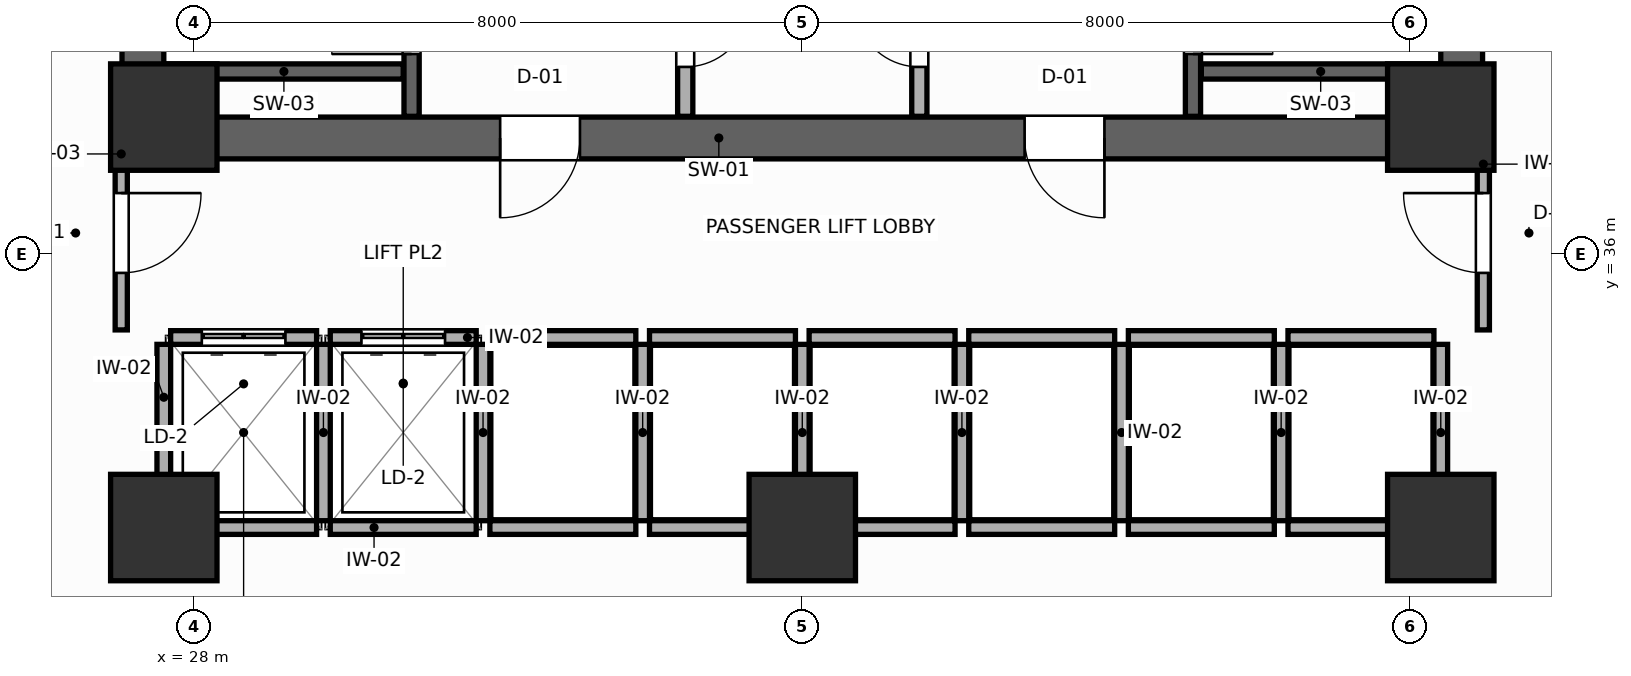
"""IFC4 building model, lengths in metres.
Left out: names, types, materials, properties, quantities, classifications, styles, units other than length and angle.
Written with IfcOpenShell. Run it as: python <this file> out.ifc"""

import sys

from ifc_helpers import new_model, si_unit, direction, frame, frame_2d, origin, origin_2d, place, context, subcontext, project, spatial, rectangle, extrude, source, transform, mapped, element, fill, save


model = new_model("IFC4")
c1 = context("Model", 3, precision=1e-05, world=origin(), true_north=direction((0.0, 1.0)))
c2 = subcontext(c1, "Body", "Model", "MODEL_VIEW")
j1 = project(units=[si_unit("LENGTHUNIT", "METRE"), si_unit("PLANEANGLEUNIT", "RADIAN")], contexts=[c1])
p1 = place(None, origin())
s1 = spatial("IfcSite", under=j1, at=p1, CompositionType="ELEMENT")
p2 = place(p1, origin())
s2 = spatial("IfcBuilding", under=s1, at=p2, CompositionType="ELEMENT")
p3 = place(p2, frame((0.0, 0.0, 79.5)))
s3 = spatial("IfcBuildingStorey", under=s2, at=p3, CompositionType="ELEMENT", Elevation=79.5)
p4 = place(p3, frame((27.05, 37.525, 0.0), z_axis=(0.0, 0.0, 1.0), x_axis=(1.0, 0.0, 0.0)))
e1 = element("IfcWall", 1, at=p4, inside=s3, PredefinedType="SHEAR", context=c2, shape_type="SweptSolid", body=[
    extrude(rectangle(XDim=17.9, YDim=0.55, at=frame_2d((8.95, 0.0))), origin(), (0.0, 0.0, 1.0), 3.9),
])
p5 = place(p4, frame((4.975, 0.0, 0.0)))
e2 = element("IfcOpeningElement", 2, at=p5, cuts=e1, PredefinedType="OPENING", context=c2, shape_type="SweptSolid", body=[
    extrude(rectangle(XDim=1.05, YDim=2.1, at=frame_2d((0.525, 1.05))), frame((0.0, 0.285, 0.0), z_axis=(0.0, -1.0, 0.0), x_axis=(1.0, 0.0, 0.0)), (0.0, 0.0, 1.0), 0.57),
])
p6 = place(p4, frame((11.875, 0.0, 0.0)))
e3 = element("IfcOpeningElement", 3, at=p6, cuts=e1, PredefinedType="OPENING", context=c2, shape_type="SweptSolid", body=[
    extrude(rectangle(XDim=1.05, YDim=2.1, at=frame_2d((0.525, 1.05))), frame((0.0, 0.285, 0.0), z_axis=(0.0, -1.0, 0.0), x_axis=(1.0, 0.0, 0.0)), (0.0, 0.0, 1.0), 0.57),
])
for number, where, z_axis, x_axis in (
    (4, (27.325, 37.8, 0.0), (0.0, 0.0, 1.0), (0.0, 1.0, 0.0)),
    (5, (44.675, 37.8, 0.0), (0.0, 0.0, 1.0), (0.0, 1.0, 0.0)),
):
    element("IfcWall", number, at=place(p3, frame(where, z_axis=z_axis, x_axis=x_axis)), inside=s3, PredefinedType="SHEAR", context=c2, shape_type="SweptSolid", body=[
        extrude(rectangle(XDim=9.0, YDim=0.55, at=frame_2d((4.5, 0.0))), origin(), (0.0, 0.0, 1.0), 3.9),
    ])
m1 = source(origin(), c2, "Body", "SweptSolid", [
    extrude(rectangle(XDim=1.4, YDim=1.4, at=origin_2d()), origin(), (0.0, 0.0, 1.0), 3.9),
])
for number, where, z_axis, x_axis in (
    (6, (27.6, 37.8, 0.0), (0.0, 0.0, 1.0), (1.0, 0.0, 0.0)),
    (7, (44.4, 37.8, 0.0), (0.0, 0.0, 1.0), (1.0, 0.0, 0.0)),
    (8, (27.6, 32.4, 0.0), (0.0, 0.0, 1.0), (1.0, 0.0, 0.0)),
    (9, (44.4, 32.4, 0.0), (0.0, 0.0, 1.0), (1.0, 0.0, 0.0)),
    (10, (36.0, 32.4, 0.0), (0.0, 0.0, 1.0), (1.0, 0.0, 0.0)),
):
    element("IfcColumn", number, at=place(p3, frame(where, z_axis=z_axis, x_axis=x_axis)), inside=s3, PredefinedType="COLUMN", context=c2, shape_type="MappedRepresentation", body=[
        mapped(m1, transform((0.0, 0.0, 0.0), scale=1.0)),
    ])
p7 = place(p3, frame((30.86, 37.81, 0.0), z_axis=(0.0, 0.0, 1.0), x_axis=(0.0, 1.0, 0.0)))
e11 = element("IfcWall", 11, at=p7, inside=s3, PredefinedType="SHEAR", context=c2, shape_type="SweptSolid", body=[
    extrude(rectangle(XDim=8.98, YDim=0.2, at=frame_2d((4.49, 0.0))), origin(), (0.0, 0.0, 1.0), 3.9),
])
p8 = place(p7, frame((0.82, 0.0, 0.0)))
e12 = element("IfcOpeningElement", 12, at=p8, cuts=e11, PredefinedType="OPENING", context=c2, shape_type="SweptSolid", body=[
    extrude(rectangle(XDim=1.05, YDim=2.1, at=frame_2d((0.525, 1.05))), frame((0.0, 0.11, 0.0), z_axis=(0.0, -1.0, 0.0), x_axis=(1.0, 0.0, 0.0)), (0.0, 0.0, 1.0), 0.22),
])
p9 = place(p3, frame((27.61, 38.4, 0.0), z_axis=(0.0, 0.0, 1.0), x_axis=(1.0, 0.0, 0.0)))
e13 = element("IfcWall", 13, at=p9, inside=s3, PredefinedType="SHEAR", context=c2, shape_type="SweptSolid", body=[
    extrude(rectangle(XDim=3.14, YDim=0.2, at=frame_2d((1.57, 0.0))), origin(), (0.0, 0.0, 1.0), 3.9),
])
p10 = place(p3, frame((41.14, 37.81, 0.0), z_axis=(0.0, 0.0, 1.0), x_axis=(0.0, 1.0, 0.0)))
e14 = element("IfcWall", 14, at=p10, inside=s3, PredefinedType="SHEAR", context=c2, shape_type="SweptSolid", body=[
    extrude(rectangle(XDim=8.98, YDim=0.2, at=frame_2d((4.49, 0.0))), origin(), (0.0, 0.0, 1.0), 3.9),
])
p11 = place(p10, frame((0.82, 0.0, 0.0)))
e15 = element("IfcOpeningElement", 15, at=p11, cuts=e14, PredefinedType="OPENING", context=c2, shape_type="SweptSolid", body=[
    extrude(rectangle(XDim=1.05, YDim=2.1, at=frame_2d((0.525, 1.05))), frame((0.0, 0.11, 0.0), z_axis=(0.0, -1.0, 0.0), x_axis=(1.0, 0.0, 0.0)), (0.0, 0.0, 1.0), 0.22),
])
p12 = place(p3, frame((41.25, 38.4, 0.0), z_axis=(0.0, 0.0, 1.0), x_axis=(1.0, 0.0, 0.0)))
e16 = element("IfcWall", 16, at=p12, inside=s3, PredefinedType="SHEAR", context=c2, shape_type="SweptSolid", body=[
    extrude(rectangle(XDim=3.14, YDim=0.2, at=frame_2d((1.57, 0.0))), origin(), (0.0, 0.0, 1.0), 3.9),
])
p13 = place(p3, frame((34.46, 37.81, 0.0), z_axis=(0.0, 0.0, 1.0), x_axis=(0.0, 1.0, 0.0)))
e17 = element("IfcWall", 17, at=p13, inside=s3, PredefinedType="PARTITIONING", context=c2, shape_type="SweptSolid", body=[
    extrude(rectangle(XDim=8.98, YDim=0.2, at=frame_2d((4.49, 0.0))), origin(), (0.0, 0.0, 1.0), 3.68),
])
p14 = place(p13, frame((0.65, 0.0, 0.0)))
e18 = element("IfcOpeningElement", 18, at=p14, cuts=e17, PredefinedType="OPENING", context=c2, shape_type="SweptSolid", body=[
    extrude(rectangle(XDim=0.85, YDim=2.05, at=frame_2d((0.425, 1.025))), frame((0.0, 0.11, 0.0), z_axis=(0.0, -1.0, 0.0), x_axis=(1.0, 0.0, 0.0)), (0.0, 0.0, 1.0), 0.22),
])
p15 = place(p3, frame((37.54, 37.81, 0.0), z_axis=(0.0, 0.0, 1.0), x_axis=(0.0, 1.0, 0.0)))
e19 = element("IfcWall", 19, at=p15, inside=s3, PredefinedType="PARTITIONING", context=c2, shape_type="SweptSolid", body=[
    extrude(rectangle(XDim=8.98, YDim=0.2, at=frame_2d((4.49, 0.0))), origin(), (0.0, 0.0, 1.0), 3.68),
])
p16 = place(p15, frame((0.65, 0.0, 0.0)))
e20 = element("IfcOpeningElement", 20, at=p16, cuts=e19, PredefinedType="OPENING", context=c2, shape_type="SweptSolid", body=[
    extrude(rectangle(XDim=0.85, YDim=2.05, at=frame_2d((0.425, 1.025))), frame((0.0, 0.11, 0.0), z_axis=(0.0, -1.0, 0.0), x_axis=(1.0, 0.0, 0.0)), (0.0, 0.0, 1.0), 0.22),
])
p17 = place(p3, frame((27.69, 34.9, 0.0), z_axis=(0.0, 0.0, 1.0), x_axis=(1.0, 0.0, 0.0)))
e21 = element("IfcWall", 21, at=p17, inside=s3, PredefinedType="PARTITIONING", context=c2, shape_type="SweptSolid", body=[
    extrude(rectangle(XDim=1.92, YDim=0.18, at=frame_2d((0.96, 0.0))), origin(), (0.0, 0.0, 1.0), 3.68),
])
p18 = place(p17, frame((0.41, 0.0, 0.0)))
e22 = element("IfcOpeningElement", 22, at=p18, cuts=e21, PredefinedType="OPENING", context=c2, shape_type="SweptSolid", body=[
    extrude(rectangle(XDim=1.1, YDim=2.1, at=frame_2d((0.55, 1.05))), frame((0.0, 0.1, 0.0), z_axis=(0.0, -1.0, 0.0), x_axis=(1.0, 0.0, 0.0)), (0.0, 0.0, 1.0), 0.2),
])
p19 = place(p3, frame((27.69, 32.4, 0.0), z_axis=(0.0, 0.0, 1.0), x_axis=(1.0, 0.0, 0.0)))
e23 = element("IfcWall", 23, at=p19, inside=s3, PredefinedType="PARTITIONING", context=c2, shape_type="SweptSolid", body=[
    extrude(rectangle(XDim=1.92, YDim=0.18, at=frame_2d((0.96, 0.0))), origin(), (0.0, 0.0, 1.0), 3.18),
])
p20 = place(p3, frame((27.6, 32.49, 0.0), z_axis=(0.0, 0.0, 1.0), x_axis=(0.0, 1.0, 0.0)))
e24 = element("IfcWall", 24, at=p20, inside=s3, PredefinedType="PARTITIONING", context=c2, shape_type="SweptSolid", body=[
    extrude(rectangle(XDim=2.32, YDim=0.18, at=frame_2d((1.16, 0.0))), origin(), (0.0, 0.0, 1.0), 3.68),
])
p21 = place(p3, frame((29.79, 34.9, 0.0), z_axis=(0.0, 0.0, 1.0), x_axis=(1.0, 0.0, 0.0)))
e25 = element("IfcWall", 25, at=p21, inside=s3, PredefinedType="PARTITIONING", context=c2, shape_type="SweptSolid", body=[
    extrude(rectangle(XDim=1.92, YDim=0.18, at=frame_2d((0.96, 0.0))), origin(), (0.0, 0.0, 1.0), 3.68),
])
p22 = place(p21, frame((0.41, 0.0, 0.0)))
e26 = element("IfcOpeningElement", 26, at=p22, cuts=e25, PredefinedType="OPENING", context=c2, shape_type="SweptSolid", body=[
    extrude(rectangle(XDim=1.1, YDim=2.1, at=frame_2d((0.55, 1.05))), frame((0.0, 0.1, 0.0), z_axis=(0.0, -1.0, 0.0), x_axis=(1.0, 0.0, 0.0)), (0.0, 0.0, 1.0), 0.2),
])
p23 = place(p3, frame((29.79, 32.4, 0.0), z_axis=(0.0, 0.0, 1.0), x_axis=(1.0, 0.0, 0.0)))
e27 = element("IfcWall", 27, at=p23, inside=s3, PredefinedType="PARTITIONING", context=c2, shape_type="SweptSolid", body=[
    extrude(rectangle(XDim=1.92, YDim=0.18, at=frame_2d((0.96, 0.0))), origin(), (0.0, 0.0, 1.0), 3.18),
])
p24 = place(p3, frame((29.7, 32.49, 0.0), z_axis=(0.0, 0.0, 1.0), x_axis=(0.0, 1.0, 0.0)))
e28 = element("IfcWall", 28, at=p24, inside=s3, PredefinedType="PARTITIONING", context=c2, shape_type="SweptSolid", body=[
    extrude(rectangle(XDim=2.32, YDim=0.18, at=frame_2d((1.16, 0.0))), origin(), (0.0, 0.0, 1.0), 3.68),
])
p25 = place(p3, frame((31.89, 34.9, 0.0), z_axis=(0.0, 0.0, 1.0), x_axis=(1.0, 0.0, 0.0)))
e29 = element("IfcWall", 29, at=p25, inside=s3, PredefinedType="PARTITIONING", context=c2, shape_type="SweptSolid", body=[
    extrude(rectangle(XDim=1.92, YDim=0.18, at=frame_2d((0.96, 0.0))), origin(), (0.0, 0.0, 1.0), 3.68),
])
p26 = place(p3, frame((31.89, 32.4, 0.0), z_axis=(0.0, 0.0, 1.0), x_axis=(1.0, 0.0, 0.0)))
e30 = element("IfcWall", 30, at=p26, inside=s3, PredefinedType="PARTITIONING", context=c2, shape_type="SweptSolid", body=[
    extrude(rectangle(XDim=1.92, YDim=0.18, at=frame_2d((0.96, 0.0))), origin(), (0.0, 0.0, 1.0), 3.18),
])
p27 = place(p3, frame((31.8, 32.49, 0.0), z_axis=(0.0, 0.0, 1.0), x_axis=(0.0, 1.0, 0.0)))
e31 = element("IfcWall", 31, at=p27, inside=s3, PredefinedType="PARTITIONING", context=c2, shape_type="SweptSolid", body=[
    extrude(rectangle(XDim=2.32, YDim=0.18, at=frame_2d((1.16, 0.0))), origin(), (0.0, 0.0, 1.0), 3.68),
])
p28 = place(p3, frame((33.99, 34.9, 0.0), z_axis=(0.0, 0.0, 1.0), x_axis=(1.0, 0.0, 0.0)))
e32 = element("IfcWall", 32, at=p28, inside=s3, PredefinedType="PARTITIONING", context=c2, shape_type="SweptSolid", body=[
    extrude(rectangle(XDim=1.92, YDim=0.18, at=frame_2d((0.96, 0.0))), origin(), (0.0, 0.0, 1.0), 3.68),
])
p29 = place(p3, frame((33.99, 32.4, 0.0), z_axis=(0.0, 0.0, 1.0), x_axis=(1.0, 0.0, 0.0)))
e33 = element("IfcWall", 33, at=p29, inside=s3, PredefinedType="PARTITIONING", context=c2, shape_type="SweptSolid", body=[
    extrude(rectangle(XDim=1.92, YDim=0.18, at=frame_2d((0.96, 0.0))), origin(), (0.0, 0.0, 1.0), 3.18),
])
p30 = place(p3, frame((33.9, 32.49, 0.0), z_axis=(0.0, 0.0, 1.0), x_axis=(0.0, 1.0, 0.0)))
e34 = element("IfcWall", 34, at=p30, inside=s3, PredefinedType="PARTITIONING", context=c2, shape_type="SweptSolid", body=[
    extrude(rectangle(XDim=2.32, YDim=0.18, at=frame_2d((1.16, 0.0))), origin(), (0.0, 0.0, 1.0), 3.68),
])
p31 = place(p3, frame((36.09, 34.9, 0.0), z_axis=(0.0, 0.0, 1.0), x_axis=(1.0, 0.0, 0.0)))
e35 = element("IfcWall", 35, at=p31, inside=s3, PredefinedType="PARTITIONING", context=c2, shape_type="SweptSolid", body=[
    extrude(rectangle(XDim=1.92, YDim=0.18, at=frame_2d((0.96, 0.0))), origin(), (0.0, 0.0, 1.0), 3.68),
])
p32 = place(p3, frame((36.09, 32.4, 0.0), z_axis=(0.0, 0.0, 1.0), x_axis=(1.0, 0.0, 0.0)))
e36 = element("IfcWall", 36, at=p32, inside=s3, PredefinedType="PARTITIONING", context=c2, shape_type="SweptSolid", body=[
    extrude(rectangle(XDim=1.92, YDim=0.18, at=frame_2d((0.96, 0.0))), origin(), (0.0, 0.0, 1.0), 3.18),
])
p33 = place(p3, frame((36.0, 32.49, 0.0), z_axis=(0.0, 0.0, 1.0), x_axis=(0.0, 1.0, 0.0)))
e37 = element("IfcWall", 37, at=p33, inside=s3, PredefinedType="PARTITIONING", context=c2, shape_type="SweptSolid", body=[
    extrude(rectangle(XDim=2.32, YDim=0.18, at=frame_2d((1.16, 0.0))), origin(), (0.0, 0.0, 1.0), 3.68),
])
p34 = place(p3, frame((38.19, 34.9, 0.0), z_axis=(0.0, 0.0, 1.0), x_axis=(1.0, 0.0, 0.0)))
e38 = element("IfcWall", 38, at=p34, inside=s3, PredefinedType="PARTITIONING", context=c2, shape_type="SweptSolid", body=[
    extrude(rectangle(XDim=1.92, YDim=0.18, at=frame_2d((0.96, 0.0))), origin(), (0.0, 0.0, 1.0), 3.68),
])
p35 = place(p3, frame((38.19, 32.4, 0.0), z_axis=(0.0, 0.0, 1.0), x_axis=(1.0, 0.0, 0.0)))
e39 = element("IfcWall", 39, at=p35, inside=s3, PredefinedType="PARTITIONING", context=c2, shape_type="SweptSolid", body=[
    extrude(rectangle(XDim=1.92, YDim=0.18, at=frame_2d((0.96, 0.0))), origin(), (0.0, 0.0, 1.0), 3.18),
])
p36 = place(p3, frame((38.1, 32.49, 0.0), z_axis=(0.0, 0.0, 1.0), x_axis=(0.0, 1.0, 0.0)))
e40 = element("IfcWall", 40, at=p36, inside=s3, PredefinedType="PARTITIONING", context=c2, shape_type="SweptSolid", body=[
    extrude(rectangle(XDim=2.32, YDim=0.18, at=frame_2d((1.16, 0.0))), origin(), (0.0, 0.0, 1.0), 3.68),
])
p37 = place(p3, frame((40.29, 34.9, 0.0), z_axis=(0.0, 0.0, 1.0), x_axis=(1.0, 0.0, 0.0)))
e41 = element("IfcWall", 41, at=p37, inside=s3, PredefinedType="PARTITIONING", context=c2, shape_type="SweptSolid", body=[
    extrude(rectangle(XDim=1.92, YDim=0.18, at=frame_2d((0.96, 0.0))), origin(), (0.0, 0.0, 1.0), 3.68),
])
p38 = place(p3, frame((40.29, 32.4, 0.0), z_axis=(0.0, 0.0, 1.0), x_axis=(1.0, 0.0, 0.0)))
e42 = element("IfcWall", 42, at=p38, inside=s3, PredefinedType="PARTITIONING", context=c2, shape_type="SweptSolid", body=[
    extrude(rectangle(XDim=1.92, YDim=0.18, at=frame_2d((0.96, 0.0))), origin(), (0.0, 0.0, 1.0), 3.18),
])
p39 = place(p3, frame((40.2, 32.49, 0.0), z_axis=(0.0, 0.0, 1.0), x_axis=(0.0, 1.0, 0.0)))
e43 = element("IfcWall", 43, at=p39, inside=s3, PredefinedType="PARTITIONING", context=c2, shape_type="SweptSolid", body=[
    extrude(rectangle(XDim=2.32, YDim=0.18, at=frame_2d((1.16, 0.0))), origin(), (0.0, 0.0, 1.0), 3.68),
])
p40 = place(p3, frame((42.39, 34.9, 0.0), z_axis=(0.0, 0.0, 1.0), x_axis=(1.0, 0.0, 0.0)))
e44 = element("IfcWall", 44, at=p40, inside=s3, PredefinedType="PARTITIONING", context=c2, shape_type="SweptSolid", body=[
    extrude(rectangle(XDim=1.92, YDim=0.18, at=frame_2d((0.96, 0.0))), origin(), (0.0, 0.0, 1.0), 3.68),
])
p41 = place(p3, frame((42.39, 32.4, 0.0), z_axis=(0.0, 0.0, 1.0), x_axis=(1.0, 0.0, 0.0)))
e45 = element("IfcWall", 45, at=p41, inside=s3, PredefinedType="PARTITIONING", context=c2, shape_type="SweptSolid", body=[
    extrude(rectangle(XDim=1.92, YDim=0.18, at=frame_2d((0.96, 0.0))), origin(), (0.0, 0.0, 1.0), 3.18),
])
for number, where, z_axis, x_axis in (
    (46, (42.3, 32.49, 0.0), (0.0, 0.0, 1.0), (0.0, 1.0, 0.0)),
    (47, (44.4, 32.49, 0.0), (0.0, 0.0, 1.0), (0.0, 1.0, 0.0)),
):
    element("IfcWall", number, at=place(p3, frame(where, z_axis=z_axis, x_axis=x_axis)), inside=s3, PredefinedType="PARTITIONING", context=c2, shape_type="SweptSolid", body=[
        extrude(rectangle(XDim=2.32, YDim=0.18, at=frame_2d((1.16, 0.0))), origin(), (0.0, 0.0, 1.0), 3.68),
    ])
p42 = place(p3, frame((27.04, 35.0, 0.0), z_axis=(0.0, 0.0, 1.0), x_axis=(0.0, 1.0, 0.0)))
e48 = element("IfcWall", 48, at=p42, inside=s3, PredefinedType="PARTITIONING", context=c2, shape_type="SweptSolid", body=[
    extrude(rectangle(XDim=2.65, YDim=0.16, at=frame_2d((1.325, 0.0))), origin(), (0.0, 0.0, 1.0), 3.68),
])
p43 = place(p42, frame((0.75, 0.0, 0.0)))
e49 = element("IfcOpeningElement", 49, at=p43, cuts=e48, PredefinedType="OPENING", context=c2, shape_type="SweptSolid", body=[
    extrude(rectangle(XDim=1.05, YDim=2.1, at=frame_2d((0.525, 1.05))), frame((0.0, 0.09, 0.0), z_axis=(0.0, -1.0, 0.0), x_axis=(1.0, 0.0, 0.0)), (0.0, 0.0, 1.0), 0.18),
])
p44 = place(p3, frame((44.96, 35.0, 0.0), z_axis=(0.0, 0.0, 1.0), x_axis=(0.0, 1.0, 0.0)))
e50 = element("IfcWall", 50, at=p44, inside=s3, PredefinedType="PARTITIONING", context=c2, shape_type="SweptSolid", body=[
    extrude(rectangle(XDim=2.65, YDim=0.16, at=frame_2d((1.325, 0.0))), origin(), (0.0, 0.0, 1.0), 3.68),
])
p45 = place(p44, frame((0.75, 0.0, 0.0)))
e51 = element("IfcOpeningElement", 51, at=p45, cuts=e50, PredefinedType="OPENING", context=c2, shape_type="SweptSolid", body=[
    extrude(rectangle(XDim=1.05, YDim=2.1, at=frame_2d((0.525, 1.05))), frame((0.0, 0.09, 0.0), z_axis=(0.0, -1.0, 0.0), x_axis=(1.0, 0.0, 0.0)), (0.0, 0.0, 1.0), 0.18),
])
p46 = place(p8, origin())
e52 = element("IfcDoor", 52, at=p46, inside=s3, OperationType="SINGLE_SWING_LEFT", PredefinedType="DOOR", context=c2, shape_type="SweptSolid", body=[
    extrude(rectangle(XDim=1.05, YDim=2.1, at=frame_2d((0.525, 1.05))), frame((0.0, 0.025, 0.0), z_axis=(0.0, -1.0, 0.0), x_axis=(1.0, 0.0, 0.0)), (0.0, 0.0, 1.0), 0.05),
])
fill(e12, e52)
p47 = place(p11, frame((1.05, 0.0, 0.0), z_axis=(0.0, 0.0, 1.0), x_axis=(-1.0, 0.0, 0.0)))
e53 = element("IfcDoor", 53, at=p47, inside=s3, OperationType="SINGLE_SWING_RIGHT", PredefinedType="DOOR", context=c2, shape_type="SweptSolid", body=[
    extrude(rectangle(XDim=1.05, YDim=2.1, at=frame_2d((0.525, 1.05))), frame((0.0, 0.025, 0.0), z_axis=(0.0, -1.0, 0.0), x_axis=(1.0, 0.0, 0.0)), (0.0, 0.0, 1.0), 0.05),
])
fill(e15, e53)
p48 = place(p14, frame((0.85, 0.0, 0.0), z_axis=(0.0, 0.0, 1.0), x_axis=(-1.0, 0.0, 0.0)))
e54 = element("IfcDoor", 54, at=p48, inside=s3, OperationType="SINGLE_SWING_LEFT", PredefinedType="DOOR", context=c2, shape_type="SweptSolid", body=[
    extrude(rectangle(XDim=0.85, YDim=2.05, at=frame_2d((0.425, 1.025))), frame((0.0, 0.025, 0.0), z_axis=(0.0, -1.0, 0.0), x_axis=(1.0, 0.0, 0.0)), (0.0, 0.0, 1.0), 0.05),
])
fill(e18, e54)
p49 = place(p16, origin())
e55 = element("IfcDoor", 55, at=p49, inside=s3, OperationType="SINGLE_SWING_RIGHT", PredefinedType="DOOR", context=c2, shape_type="SweptSolid", body=[
    extrude(rectangle(XDim=0.85, YDim=2.05, at=frame_2d((0.425, 1.025))), frame((0.0, 0.025, 0.0), z_axis=(0.0, -1.0, 0.0), x_axis=(1.0, 0.0, 0.0)), (0.0, 0.0, 1.0), 0.05),
])
fill(e20, e55)
p50 = place(p18, origin())
e56 = element("IfcDoor", 56, at=p50, inside=s3, OperationType="DOUBLE_DOOR_SLIDING", PredefinedType="DOOR", context=c2, shape_type="SweptSolid", body=[
    extrude(rectangle(XDim=1.1, YDim=2.1, at=frame_2d((0.55, 1.05))), frame((0.0, 0.025, 0.0), z_axis=(0.0, -1.0, 0.0), x_axis=(1.0, 0.0, 0.0)), (0.0, 0.0, 1.0), 0.05),
])
fill(e22, e56)
p51 = place(p22, origin())
e57 = element("IfcDoor", 57, at=p51, inside=s3, OperationType="DOUBLE_DOOR_SLIDING", PredefinedType="DOOR", context=c2, shape_type="SweptSolid", body=[
    extrude(rectangle(XDim=1.1, YDim=2.1, at=frame_2d((0.55, 1.05))), frame((0.0, 0.025, 0.0), z_axis=(0.0, -1.0, 0.0), x_axis=(1.0, 0.0, 0.0)), (0.0, 0.0, 1.0), 0.05),
])
fill(e26, e57)
p52 = place(p43, frame((1.05, 0.0, 0.0), z_axis=(0.0, 0.0, 1.0), x_axis=(-1.0, 0.0, 0.0)))
e58 = element("IfcDoor", 58, at=p52, inside=s3, OperationType="SINGLE_SWING_LEFT", PredefinedType="DOOR", context=c2, shape_type="SweptSolid", body=[
    extrude(rectangle(XDim=1.05, YDim=2.1, at=frame_2d((0.525, 1.05))), frame((0.0, 0.025, 0.0), z_axis=(0.0, -1.0, 0.0), x_axis=(1.0, 0.0, 0.0)), (0.0, 0.0, 1.0), 0.05),
])
fill(e49, e58)
p53 = place(p45, origin())
e59 = element("IfcDoor", 59, at=p53, inside=s3, OperationType="SINGLE_SWING_RIGHT", PredefinedType="DOOR", context=c2, shape_type="SweptSolid", body=[
    extrude(rectangle(XDim=1.05, YDim=2.1, at=frame_2d((0.525, 1.05))), frame((0.0, 0.025, 0.0), z_axis=(0.0, -1.0, 0.0), x_axis=(1.0, 0.0, 0.0)), (0.0, 0.0, 1.0), 0.05),
])
fill(e51, e59)
p54 = place(p5, frame((1.05, 0.0, 0.0), z_axis=(0.0, 0.0, 1.0), x_axis=(-1.0, 0.0, 0.0)))
e60 = element("IfcDoor", 60, at=p54, inside=s3, OperationType="SINGLE_SWING_RIGHT", PredefinedType="DOOR", context=c2, shape_type="SweptSolid", body=[
    extrude(rectangle(XDim=1.05, YDim=2.1, at=frame_2d((0.525, 1.05))), frame((0.0, 0.025, 0.0), z_axis=(0.0, -1.0, 0.0), x_axis=(1.0, 0.0, 0.0)), (0.0, 0.0, 1.0), 0.05),
])
fill(e2, e60)
p55 = place(p6, frame((1.05, 0.0, 0.0), z_axis=(0.0, 0.0, 1.0), x_axis=(-1.0, 0.0, 0.0)))
e61 = element("IfcDoor", 61, at=p55, inside=s3, OperationType="SINGLE_SWING_LEFT", PredefinedType="DOOR", context=c2, shape_type="SweptSolid", body=[
    extrude(rectangle(XDim=1.05, YDim=2.1, at=frame_2d((0.525, 1.05))), frame((0.0, 0.025, 0.0), z_axis=(0.0, -1.0, 0.0), x_axis=(1.0, 0.0, 0.0)), (0.0, 0.0, 1.0), 0.05),
])
fill(e3, e61)
save(model, sys.argv[1])
